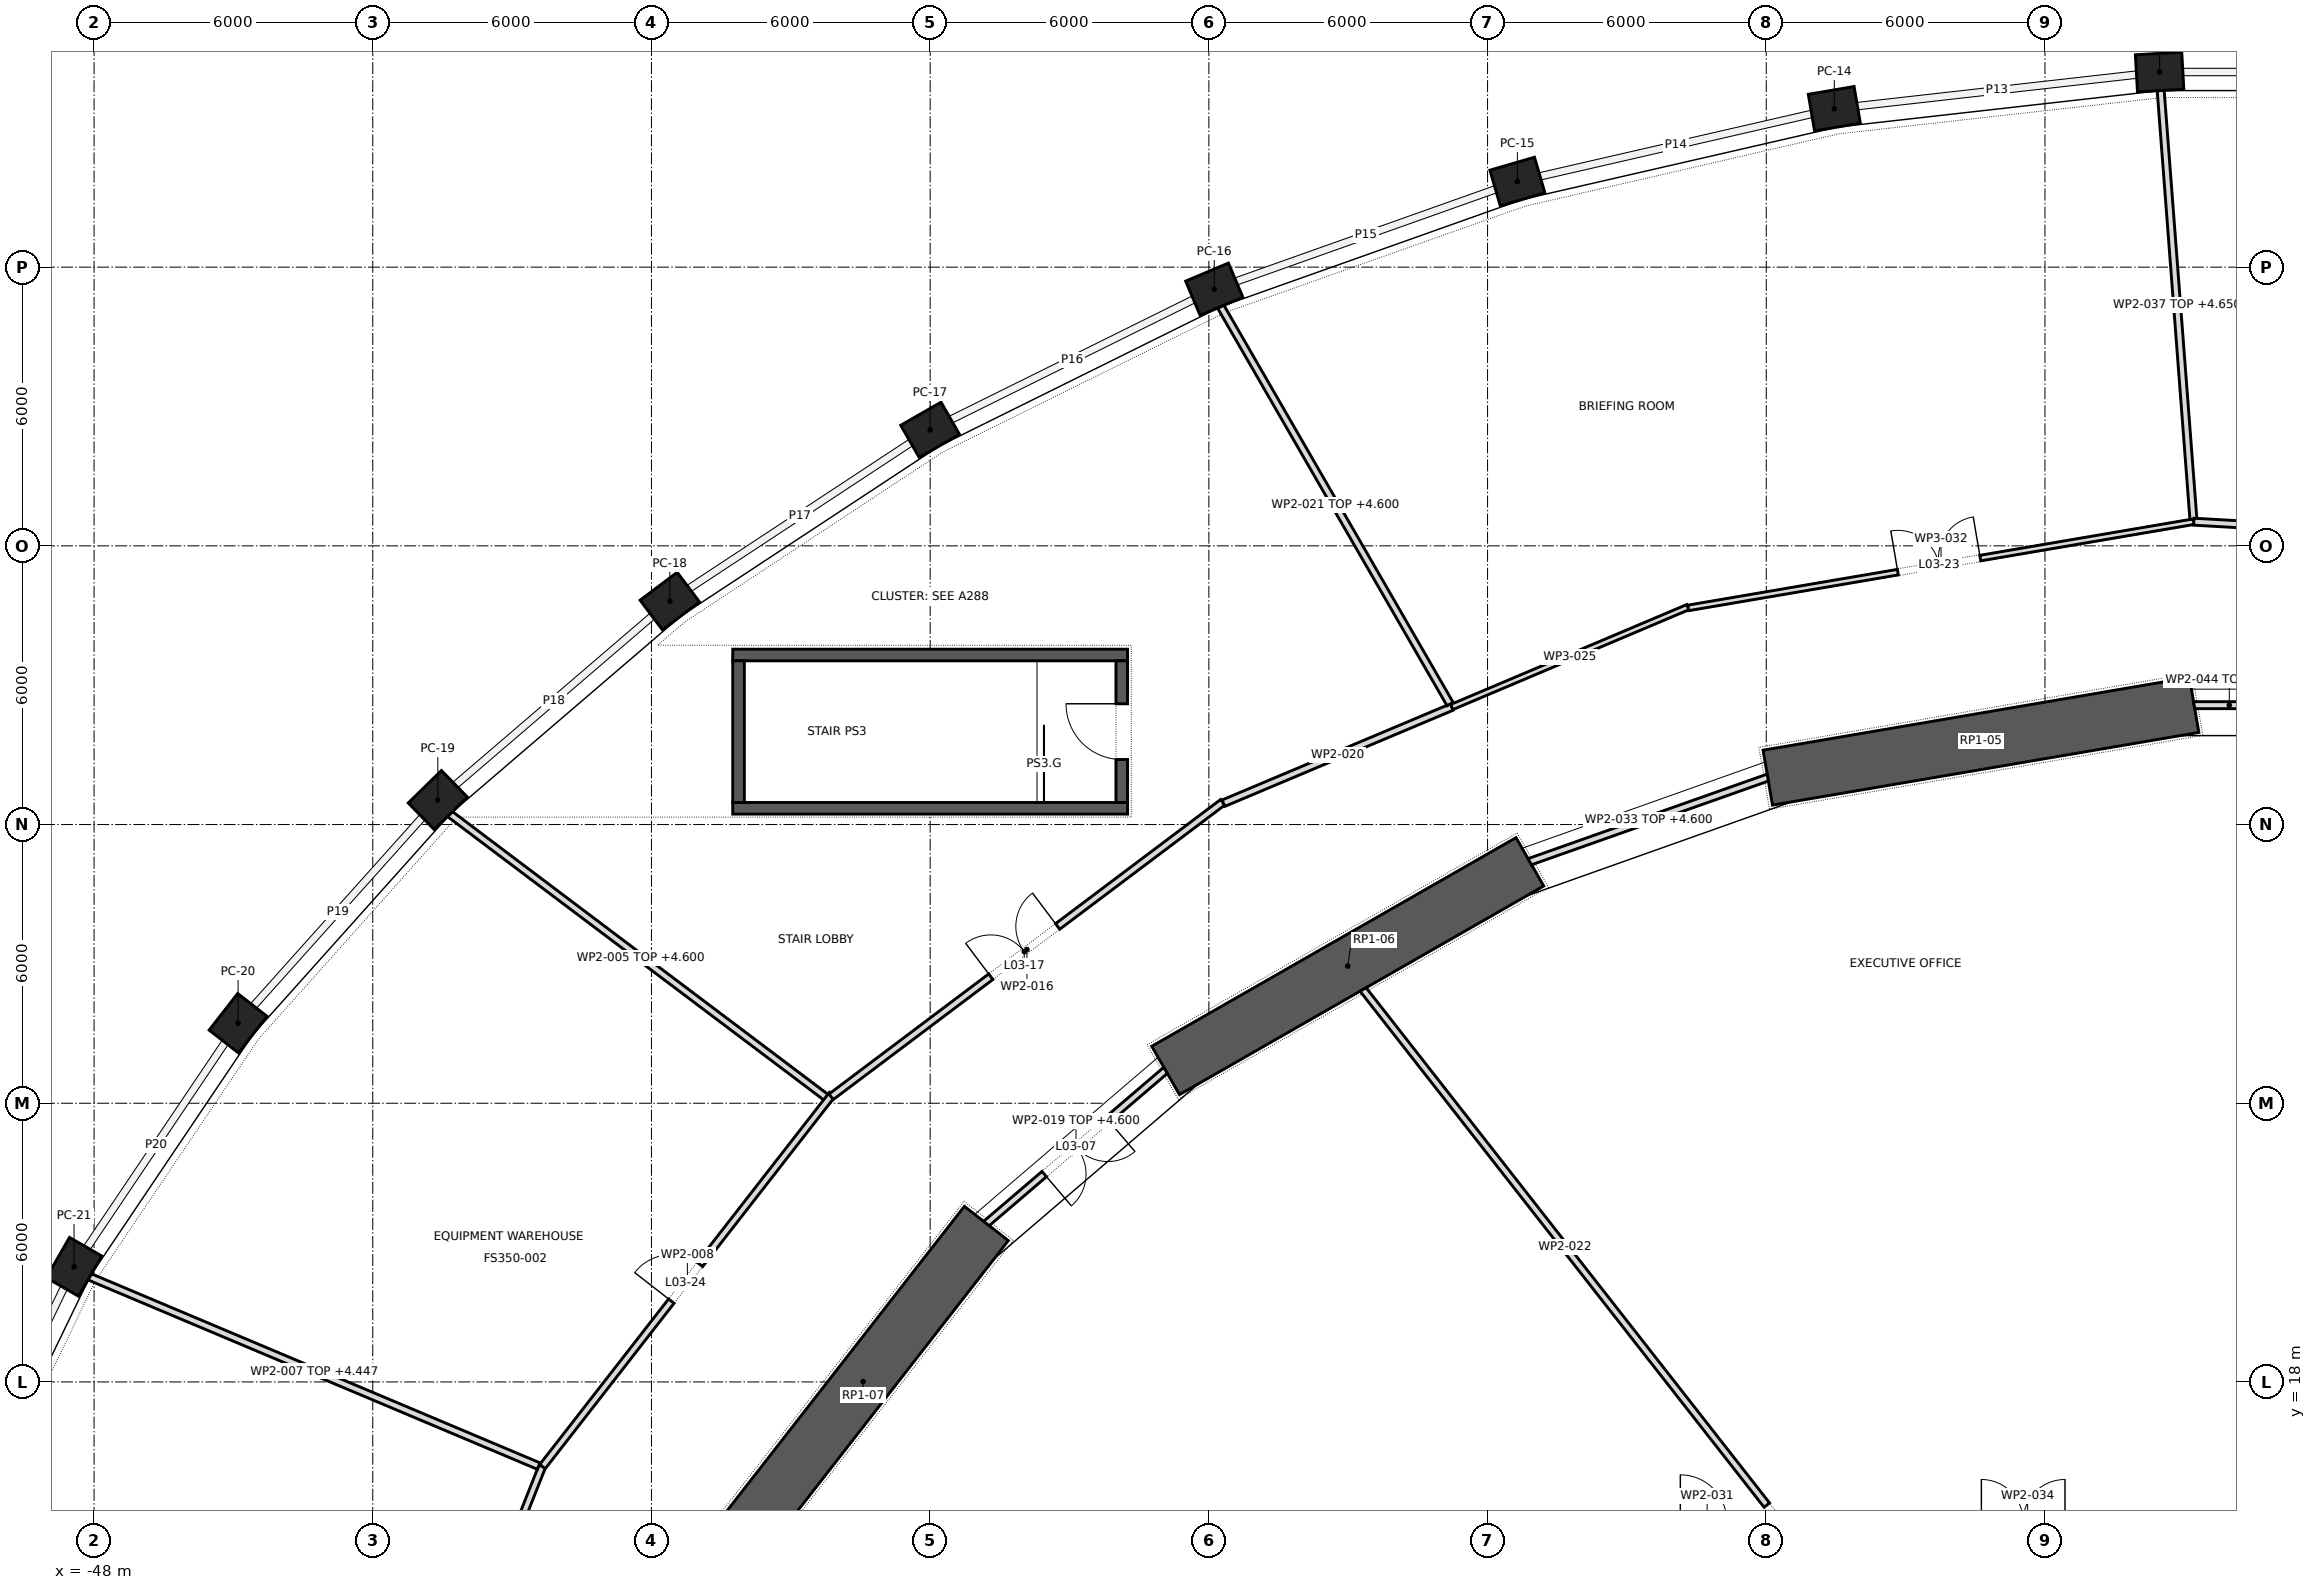
"""IFC4 building model, lengths in metres.
Left out: names, types, materials, properties, quantities, classifications, styles, units other than length and angle.
Written with IfcOpenShell. Run it as: python <this file> out.ifc"""

import sys

from ifc_helpers import new_model, si_unit, direction, frame, frame_2d, origin, origin_2d, place, context, subcontext, project, spatial, polyline, rectangle, outline, extrude, element, fill, save


model = new_model("IFC4")
c1 = context("Model", 3, precision=1e-05, world=origin(), true_north=direction((0.0, 1.0)))
c2 = subcontext(c1, "Body", "Model", "MODEL_VIEW")
j1 = project(units=[si_unit("LENGTHUNIT", "METRE"), si_unit("PLANEANGLEUNIT", "RADIAN")], contexts=[c1])
p1 = place(None, origin())
s1 = spatial("IfcSite", under=j1, at=p1, CompositionType="ELEMENT")
p2 = place(p1, origin())
s2 = spatial("IfcBuilding", under=s1, at=p2, CompositionType="ELEMENT")
p3 = place(p2, frame((0.0, 0.0, 18.0)))
s3 = spatial("IfcBuildingStorey", under=s2, at=p3, CompositionType="ELEMENT", Elevation=18.0)
for number, where, z_axis, x_axis in (
    (1, (-3.532, 46.201, 0.0), (0.0, 0.0, 1.0), (-0.998, -0.056, 0.0)),
    (2, (-10.535, 45.41, 0.0), (0.0, 0.0, 1.0), (-0.986, -0.168, 0.0)),
    (3, (-17.358, 43.843, 0.0), (0.0, 0.0, 1.0), (-0.96, -0.279, 0.0)),
    (4, (-23.884, 41.525, 0.0), (0.0, 0.0, 1.0), (-0.921, -0.389, 0.0)),
    (5, (-30.001, 38.497, 0.0), (0.0, 0.0, 1.0), (-0.868, -0.497, 0.0)),
    (6, (-35.605, 34.81, 0.0), (0.0, 0.0, 1.0), (-0.799, -0.601, 0.0)),
    (7, (-40.599, 30.528, 0.0), (0.0, 0.0, 1.0), (-0.715, -0.699, 0.0)),
    (8, (-44.899, 25.723, 0.0), (0.0, 0.0, 1.0), (-0.615, -0.789, 0.0)),
    (9, (-48.431, 20.478, 0.0), (0.0, 0.0, 1.0), (-0.499, -0.867, 0.0)),
):
    element("IfcColumn", number, at=place(p3, frame(where, z_axis=z_axis, x_axis=x_axis)), inside=s3, PredefinedType="COLUMN", context=c2, shape_type="SweptSolid", body=[
        extrude(rectangle(XDim=1.0, YDim=0.8, at=origin_2d()), origin(), (0.0, 0.0, 1.0), 5.5),
    ])
p4 = place(p3, frame((-2.788, 32.574, 0.0), z_axis=(0.0, 0.0, 1.0), x_axis=(-0.985776286846, -0.168062822456, 0.0)))
e10 = element("IfcWall", 10, at=p4, inside=s3, PredefinedType="SHEAR", context=c2, shape_type="SweptSolid", body=[
    extrude(rectangle(XDim=9.312, YDim=1.2, at=frame_2d((4.656, 0.0))), origin(), (0.0, 0.0, 1.0), 5.5),
])
p5 = place(p3, frame((-17.089, 29.198, 0.0), z_axis=(0.0, 0.0, 1.0), x_axis=(-0.867760656864, -0.496982336103, 0.0)))
e11 = element("IfcWall", 11, at=p5, inside=s3, PredefinedType="SHEAR", context=c2, shape_type="SweptSolid", body=[
    extrude(rectangle(XDim=9.038, YDim=1.2, at=frame_2d((4.519, 0.0))), origin(), (0.0, 0.0, 1.0), 5.5),
])
p6 = place(p3, frame((-28.79, 21.412, 0.0), z_axis=(0.0, 0.0, 1.0), x_axis=(-0.614825322247, -0.788663314174, 0.0)))
e12 = element("IfcWall", 12, at=p6, inside=s3, PredefinedType="SHEAR", context=c2, shape_type="SweptSolid", body=[
    extrude(rectangle(XDim=8.632, YDim=1.2, at=frame_2d((4.316, 0.0))), origin(), (0.0, 0.0, 1.0), 5.5),
])
for number, where, z_axis, x_axis in (
    (13, (-34.25, 33.65, 0.0), (0.0, 0.0, 1.0), (1.0, 0.0, 0.0)),
    (14, (-34.25, 30.35, 0.0), (0.0, 0.0, 1.0), (1.0, 0.0, 0.0)),
):
    element("IfcWall", number, at=place(p3, frame(where, z_axis=z_axis, x_axis=x_axis)), inside=s3, PredefinedType="SHEAR", context=c2, shape_type="SweptSolid", body=[
        extrude(rectangle(XDim=8.5, YDim=0.25, at=frame_2d((4.25, 0.0))), origin(), (0.0, 0.0, 1.0), 5.2),
    ])
p7 = place(p3, frame((-34.125, 30.475, 0.0), z_axis=(0.0, 0.0, 1.0), x_axis=(0.0, 1.0, 0.0)))
e15 = element("IfcWall", 15, at=p7, inside=s3, PredefinedType="SHEAR", context=c2, shape_type="SweptSolid", body=[
    extrude(rectangle(XDim=3.05, YDim=0.25, at=frame_2d((1.525, 0.0))), origin(), (0.0, 0.0, 1.0), 5.2),
])
p8 = place(p3, frame((-25.875, 30.475, 0.0), z_axis=(0.0, 0.0, 1.0), x_axis=(0.0, 1.0, 0.0)))
e16 = element("IfcWall", 16, at=p8, inside=s3, PredefinedType="SHEAR", context=c2, shape_type="SweptSolid", body=[
    extrude(rectangle(XDim=3.05, YDim=0.25, at=frame_2d((1.525, 0.0))), origin(), (0.0, 0.0, 1.0), 5.2),
])
p9 = place(p8, frame((0.925, 0.0, 0.0)))
e17 = element("IfcOpeningElement", 17, at=p9, cuts=e16, PredefinedType="OPENING", context=c2, shape_type="SweptSolid", body=[
    extrude(rectangle(XDim=1.2, YDim=2.1, at=frame_2d((0.6, 1.05))), frame((0.0, 0.137, 0.0), z_axis=(0.0, -1.0, 0.0), x_axis=(1.0, 0.0, 0.0)), (0.0, 0.0, 1.0), 0.274),
])
p10 = place(p3, frame((-41.899, 7.234, 0.0), z_axis=(0.0, 0.0, 1.0), x_axis=(0.36854636118, 0.929609369392, 0.0)))
e18 = element("IfcWall", 18, at=p10, inside=s3, PredefinedType="PARTITIONING", context=c2, shape_type="SweptSolid", body=[
    extrude(rectangle(XDim=9.625, YDim=0.15, at=frame_2d((4.812, 0.0))), origin(), (0.0, 0.0, 1.0), 5.2),
])
p11 = place(p10, frame((3.845, 0.0, 0.0)))
e19 = element("IfcOpeningElement", 19, at=p11, cuts=e18, PredefinedType="OPENING", context=c2, shape_type="SweptSolid", body=[
    extrude(rectangle(XDim=1.8, YDim=2.1, at=frame_2d((0.9, 1.05))), frame((0.0, 0.087, 0.0), z_axis=(0.0, -1.0, 0.0), x_axis=(1.0, 0.0, 0.0)), (0.0, 0.0, 1.0), 0.174),
])
p12 = place(p3, frame((-40.338, 30.225, 0.0), z_axis=(0.0, 0.0, 1.0), x_axis=(0.798789212221, -0.601610999267, 0.0)))
e20 = element("IfcWall", 20, at=p12, inside=s3, PredefinedType="PARTITIONING", context=c2, shape_type="SweptSolid", body=[
    extrude(outline(polyline([(-0.011, -0.075), (10.273, -0.075), (10.273, 0.075), (0.011, 0.075), (-0.011, -0.075)])), origin(), (0.0, 0.0, 1.0), 4.6),
])
p13 = place(p3, frame((-38.429, 16.189, 0.0), z_axis=(0.0, 0.0, 1.0), x_axis=(-0.92149423112, 0.388392046793, 0.0)))
e21 = element("IfcWall", 21, at=p13, inside=s3, PredefinedType="PARTITIONING", context=c2, shape_type="SweptSolid", body=[
    extrude(outline(polyline([(0.0, -0.075), (10.479, -0.075), (10.498, 0.075), (0.0, 0.075), (0.0, -0.075)])), origin(), (0.0, 0.0, 1.0), 4.447),
])
p14 = place(p3, frame((-38.346, 16.178, 0.0), z_axis=(0.0, 0.0, 1.0), x_axis=(0.614345056522, 0.789037484235, 0.0)))
e22 = element("IfcWall", 22, at=p14, inside=s3, PredefinedType="PARTITIONING", context=c2, shape_type="SweptSolid", body=[
    extrude(rectangle(XDim=10.153, YDim=0.15, at=frame_2d((5.077, 0.0))), origin(), (0.0, 0.0, 1.0), 5.2),
])
p15 = place(p14, frame((4.515, 0.0, 0.0)))
e23 = element("IfcOpeningElement", 23, at=p15, cuts=e22, PredefinedType="OPENING", context=c2, shape_type="SweptSolid", body=[
    extrude(rectangle(XDim=1.0, YDim=2.1, at=frame_2d((0.5, 1.05))), frame((0.0, 0.087, 0.0), z_axis=(0.0, -1.0, 0.0), x_axis=(1.0, 0.0, 0.0)), (0.0, 0.0, 1.0), 0.174),
])
p16 = place(p3, frame((-32.132, 24.139, 0.0), z_axis=(0.0, 0.0, 1.0), x_axis=(0.799199441693, 0.601065930158, 0.0)))
e24 = element("IfcWall", 24, at=p16, inside=s3, PredefinedType="PARTITIONING", context=c2, shape_type="SweptSolid", body=[
    extrude(rectangle(XDim=10.549, YDim=0.15, at=frame_2d((5.274, 0.0))), origin(), (0.0, 0.0, 1.0), 5.2),
])
p17 = place(p16, frame((4.301, 0.0, 0.0)))
e25 = element("IfcOpeningElement", 25, at=p17, cuts=e24, PredefinedType="OPENING", context=c2, shape_type="SweptSolid", body=[
    extrude(rectangle(XDim=1.8, YDim=2.1, at=frame_2d((0.9, 1.05))), frame((0.0, 0.087, 0.0), z_axis=(0.0, -1.0, 0.0), x_axis=(1.0, 0.0, 0.0)), (0.0, 0.0, 1.0), 0.174),
])
p18 = place(p3, frame((-24.932, 24.708, 0.0), z_axis=(0.0, 0.0, 1.0), x_axis=(-0.760084552743, -0.649824185978, 0.0)))
e26 = element("IfcWall", 26, at=p18, inside=s3, PredefinedType="PARTITIONING", context=c2, shape_type="SweptSolid", body=[
    extrude(outline(polyline([(-0.014, -0.075), (5.09, -0.075), (5.06, 0.075), (0.014, 0.075), (-0.014, -0.075)])), origin(), (0.0, 0.0, 1.0), 4.6),
])
p19 = place(p18, frame((1.637, 0.0, 0.0)))
e27 = element("IfcOpeningElement", 27, at=p19, cuts=e26, PredefinedType="OPENING", context=c2, shape_type="SweptSolid", body=[
    extrude(rectangle(XDim=1.8, YDim=2.1, at=frame_2d((0.9, 1.05))), frame((0.0, 0.087, 0.0), z_axis=(0.0, -1.0, 0.0), x_axis=(1.0, 0.0, 0.0)), (0.0, 0.0, 1.0), 0.174),
])
p20 = place(p3, frame((-23.687, 30.459, 0.0), z_axis=(0.0, 0.0, 1.0), x_axis=(0.921600059119, 0.388140864934, 0.0)))
e28 = element("IfcWall", 28, at=p20, inside=s3, PredefinedType="PARTITIONING", context=c2, shape_type="SweptSolid", body=[
    extrude(rectangle(XDim=5.336, YDim=0.15, at=frame_2d((2.668, 0.0))), origin(), (0.0, 0.0, 1.0), 5.2),
])
p21 = place(p3, frame((-23.745, 41.15, 0.0), z_axis=(0.0, 0.0, 1.0), x_axis=(0.49985011379, -0.866111923336, 0.0)))
e29 = element("IfcWall", 29, at=p21, inside=s3, PredefinedType="PARTITIONING", context=c2, shape_type="SweptSolid", body=[
    extrude(outline(polyline([(-0.009, -0.075), (9.878, -0.075), (9.878, 0.075), (0.009, 0.075), (-0.009, -0.075)])), origin(), (0.0, 0.0, 1.0), 4.6),
])
p22 = place(p3, frame((-20.68, 26.45, 0.0), z_axis=(0.0, 0.0, 1.0), x_axis=(0.616465586388, -0.787381851962, 0.0)))
e30 = element("IfcWall", 30, at=p22, inside=s3, PredefinedType="PARTITIONING", context=c2, shape_type="SweptSolid", body=[
    extrude(outline(polyline([(-0.011, -0.075), (14.1, -0.075), (14.1, 0.075), (0.011, 0.075), (-0.011, -0.075)])), origin(), (0.0, 0.0, 1.0), 5.2),
])
p23 = place(p3, frame((-18.77, 32.53, 0.0), z_axis=(0.0, 0.0, 1.0), x_axis=(0.920949546313, 0.389681835792, 0.0)))
e31 = element("IfcWall", 31, at=p23, inside=s3, PredefinedType="PARTITIONING", context=c2, shape_type="SweptSolid", body=[
    extrude(rectangle(XDim=5.52, YDim=0.12, at=frame_2d((2.76, 0.0))), origin(), (0.0, 0.0, 1.0), 5.2),
])
p24 = place(p3, frame((-13.68, 34.664, 0.0), z_axis=(0.0, 0.0, 1.0), x_axis=(0.985752612564, 0.168201625505, 0.0)))
e32 = element("IfcWall", 32, at=p24, inside=s3, PredefinedType="PARTITIONING", context=c2, shape_type="SweptSolid", body=[
    extrude(rectangle(XDim=11.043, YDim=0.12, at=frame_2d((5.521, 0.0))), origin(), (0.0, 0.0, 1.0), 5.2),
])
p25 = place(p24, frame((4.578, 0.0, 0.0)))
e33 = element("IfcOpeningElement", 33, at=p25, cuts=e32, PredefinedType="OPENING", context=c2, shape_type="SweptSolid", body=[
    extrude(rectangle(XDim=1.8, YDim=2.1, at=frame_2d((0.9, 1.05))), frame((0.0, 0.072, 0.0), z_axis=(0.0, -1.0, 0.0), x_axis=(1.0, 0.0, 0.0)), (0.0, 0.0, 1.0), 0.144),
])
p26 = place(p3, frame((-11.967, 31.011, 0.0), z_axis=(0.0, 0.0, 1.0), x_axis=(-0.942814385805, -0.333318217204, 0.0)))
e34 = element("IfcWall", 34, at=p26, inside=s3, PredefinedType="PARTITIONING", context=c2, shape_type="SweptSolid", body=[
    extrude(outline(polyline([(-0.013, -0.075), (5.448, -0.075), (5.421, 0.075), (0.013, 0.075), (-0.013, -0.075)])), origin(), (0.0, 0.0, 1.0), 4.6),
])
p27 = place(p3, frame((-2.804, 36.573, 0.0), z_axis=(0.0, 0.0, 1.0), x_axis=(-0.076121640679, 0.997098538671, 0.0)))
e35 = element("IfcWall", 35, at=p27, inside=s3, PredefinedType="PARTITIONING", context=c2, shape_type="SweptSolid", body=[
    extrude(outline(polyline([(0.0, -0.075), (9.255, -0.075), (9.258, 0.075), (0.0, 0.075), (0.0, -0.075)])), origin(), (0.0, 0.0, 1.0), 4.65),
])
p28 = place(p3, frame((-2.795, 36.52, 0.0), z_axis=(0.0, 0.0, 1.0), x_axis=(0.998407334581, -0.056416258786, 0.0)))
e36 = element("IfcWall", 36, at=p28, inside=s3, PredefinedType="PARTITIONING", context=c2, shape_type="SweptSolid", body=[
    extrude(rectangle(XDim=11.26, YDim=0.15, at=frame_2d((5.63, 0.0))), origin(), (0.0, 0.0, 1.0), 5.2),
])
p29 = place(p28, frame((4.679, 0.0, 0.0)))
e37 = element("IfcOpeningElement", 37, at=p29, cuts=e36, PredefinedType="OPENING", context=c2, shape_type="SweptSolid", body=[
    extrude(rectangle(XDim=1.8, YDim=2.1, at=frame_2d((0.9, 1.05))), frame((0.0, 0.087, 0.0), z_axis=(0.0, -1.0, 0.0), x_axis=(1.0, 0.0, 0.0)), (0.0, 0.0, 1.0), 0.174),
])
p30 = place(p3, frame((-1.275, 32.57, 0.0), z_axis=(0.0, 0.0, 1.0), x_axis=(-1.0, 0.0, 0.0)))
e38 = element("IfcWall", 38, at=p30, inside=s3, PredefinedType="PARTITIONING", context=c2, shape_type="SweptSolid", body=[
    extrude(outline(polyline([(0.0, -0.075), (1.526, -0.075), (1.5, 0.075), (0.0, 0.075), (0.0, -0.075)])), origin(), (0.0, 0.0, 1.0), 4.6),
])
p31 = place(p9, origin())
e39 = element("IfcDoor", 39, at=p31, inside=s3, OperationType="SINGLE_SWING_LEFT", PredefinedType="DOOR", context=c2, shape_type="SweptSolid", body=[
    extrude(rectangle(XDim=1.2, YDim=2.1, at=frame_2d((0.6, 1.05))), frame((0.0, 0.025, 0.0), z_axis=(0.0, -1.0, 0.0), x_axis=(1.0, 0.0, 0.0)), (0.0, 0.0, 1.0), 0.05),
])
fill(e17, e39)
p32 = place(p19, origin())
e40 = element("IfcDoor", 40, at=p32, inside=s3, OperationType="DOUBLE_DOOR_SINGLE_SWING", PredefinedType="DOOR", context=c2, shape_type="SweptSolid", body=[
    extrude(rectangle(XDim=1.8, YDim=2.1, at=frame_2d((0.9, 1.05))), frame((0.0, 0.025, 0.0), z_axis=(0.0, -1.0, 0.0), x_axis=(1.0, 0.0, 0.0)), (0.0, 0.0, 1.0), 0.05),
])
fill(e27, e40)
p33 = place(p17, origin())
e41 = element("IfcDoor", 41, at=p33, inside=s3, OperationType="DOUBLE_DOOR_SINGLE_SWING", PredefinedType="DOOR", context=c2, shape_type="SweptSolid", body=[
    extrude(rectangle(XDim=1.8, YDim=2.1, at=frame_2d((0.9, 1.05))), frame((0.0, 0.025, 0.0), z_axis=(0.0, -1.0, 0.0), x_axis=(1.0, 0.0, 0.0)), (0.0, 0.0, 1.0), 0.05),
])
fill(e25, e41)
p34 = place(p25, origin())
e42 = element("IfcDoor", 42, at=p34, inside=s3, OperationType="DOUBLE_DOOR_SINGLE_SWING", PredefinedType="DOOR", context=c2, shape_type="SweptSolid", body=[
    extrude(rectangle(XDim=1.8, YDim=2.1, at=frame_2d((0.9, 1.05))), frame((0.0, 0.025, 0.0), z_axis=(0.0, -1.0, 0.0), x_axis=(1.0, 0.0, 0.0)), (0.0, 0.0, 1.0), 0.05),
])
fill(e33, e42)
p35 = place(p15, origin())
e43 = element("IfcDoor", 43, at=p35, inside=s3, OperationType="SINGLE_SWING_RIGHT", PredefinedType="DOOR", context=c2, shape_type="SweptSolid", body=[
    extrude(rectangle(XDim=1.0, YDim=2.1, at=frame_2d((0.5, 1.05))), frame((0.0, 0.025, 0.0), z_axis=(0.0, -1.0, 0.0), x_axis=(1.0, 0.0, 0.0)), (0.0, 0.0, 1.0), 0.05),
])
fill(e23, e43)
save(model, sys.argv[1])
